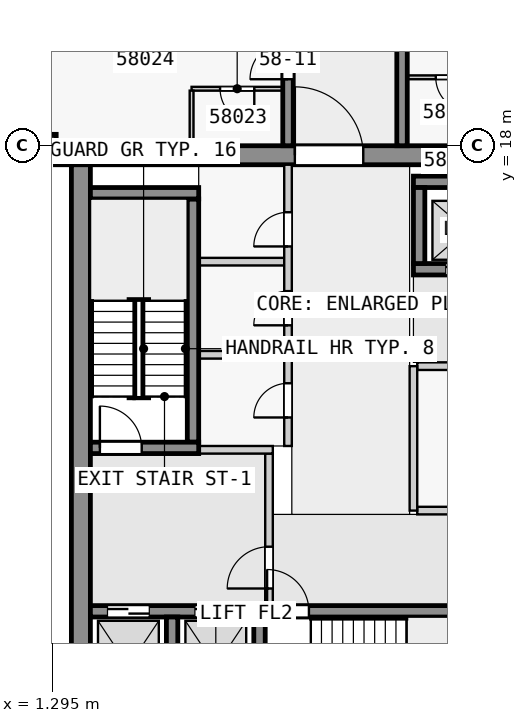
"""IFC4 building model, lengths in metres.
Left out: names, types, materials, properties, quantities, classifications, styles, units other than length and angle.
Written with IfcOpenShell. Run it as: python <this file> out.ifc"""

import sys

from ifc_helpers import new_model, si_unit, direction, frame, frame_2d, origin, origin_2d, place, context, subcontext, project, spatial, rectangle, extrude, element, fill, save


model = new_model("IFC4")
c1 = context("Model", 3, precision=1e-05, world=origin(), true_north=direction((0.0, 1.0)))
c2 = subcontext(c1, "Body", "Model", "MODEL_VIEW")
j1 = project(units=[si_unit("LENGTHUNIT", "METRE"), si_unit("PLANEANGLEUNIT", "RADIAN")], contexts=[c1])
p1 = place(None, origin())
s1 = spatial("IfcSite", under=j1, at=p1, CompositionType="ELEMENT")
p2 = place(p1, origin())
s2 = spatial("IfcBuilding", under=s1, at=p2, CompositionType="ELEMENT")
p3 = place(p2, frame((0.0, 0.0, 222.4)))
s3 = spatial("IfcBuildingStorey", under=s2, at=p3, CompositionType="ELEMENT", Elevation=222.4)
p4 = place(p3, frame((0.7, 18.0, 0.0), z_axis=(0.0, 0.0, 1.0), x_axis=(0.0, 1.0, 0.0)))
e1 = element("IfcColumn", 1, at=p4, inside=s3, PredefinedType="COLUMN", context=c2, shape_type="SweptSolid", body=[
    extrude(rectangle(XDim=0.6, YDim=1.4, at=origin_2d()), origin(), (0.0, 0.0, 1.0), 3.5),
])
p5 = place(p3, frame((1.38, 17.75, 0.0), z_axis=(0.0, 0.0, 1.0), x_axis=(1.0, 0.0, 0.0)))
e2 = element("IfcWall", 2, at=p5, inside=s3, PredefinedType="SHEAR", context=c2, shape_type="SweptSolid", body=[
    extrude(rectangle(XDim=21.12, YDim=0.5, at=frame_2d((10.56, 0.0))), origin(), (0.0, 0.0, 1.0), 3.25),
])
p6 = place(p5, frame((6.3, 0.0, 0.0)))
e3 = element("IfcOpeningElement", 3, at=p6, cuts=e2, PredefinedType="OPENING", context=c2, shape_type="SweptSolid", body=[
    extrude(rectangle(XDim=1.8, YDim=2.1, at=frame_2d((0.9, 1.05))), frame((0.0, 0.26, 0.0), z_axis=(0.0, -1.0, 0.0), x_axis=(1.0, 0.0, 0.0)), (0.0, 0.0, 1.0), 0.52),
])
p7 = place(p3, frame((2.05, 2.5, 0.0), z_axis=(0.0, 0.0, 1.0), x_axis=(0.0, 1.0, 0.0)))
e4 = element("IfcWall", 4, at=p7, inside=s3, PredefinedType="SHEAR", context=c2, shape_type="SweptSolid", body=[
    extrude(rectangle(XDim=15.0, YDim=0.5, at=frame_2d((7.5, 0.0))), origin(), (0.0, 0.0, 1.0), 3.25),
])
for number, where, z_axis, x_axis in (
    (5, (4.45, 2.8, 0.0), (0.0, 0.0, 1.0), (0.0, 1.0, 0.0)),
    (6, (6.75, 2.8, 0.0), (0.0, 0.0, 1.0), (0.0, 1.0, 0.0)),
):
    element("IfcWall", number, at=place(p3, frame(where, z_axis=z_axis, x_axis=x_axis)), inside=s3, PredefinedType="SHEAR", context=c2, shape_type="SweptSolid", body=[
        extrude(rectangle(XDim=2.8, YDim=0.3, at=frame_2d((1.4, 0.0))), origin(), (0.0, 0.0, 1.0), 3.25),
    ])
p8 = place(p3, frame((2.3, 5.75, 0.0), z_axis=(0.0, 0.0, 1.0), x_axis=(1.0, 0.0, 0.0)))
e7 = element("IfcWall", 7, at=p8, inside=s3, PredefinedType="SHEAR", context=c2, shape_type="SweptSolid", body=[
    extrude(rectangle(XDim=18.8, YDim=0.3, at=frame_2d((9.4, 0.0))), origin(), (0.0, 0.0, 1.0), 3.25),
])
p9 = place(p8, frame((4.65, 0.0, 0.0)))
e8 = element("IfcOpeningElement", 8, at=p9, cuts=e7, PredefinedType="OPENING", context=c2, shape_type="SweptSolid", body=[
    extrude(rectangle(XDim=1.1, YDim=2.1, at=frame_2d((0.55, 1.05))), frame((0.0, 0.16, 0.0), z_axis=(0.0, -1.0, 0.0), x_axis=(1.0, 0.0, 0.0)), (0.0, 0.0, 1.0), 0.32),
])
p10 = place(p8, frame((0.45, 0.0, 0.0)))
e9 = element("IfcOpeningElement", 9, at=p10, cuts=e7, PredefinedType="OPENING", context=c2, shape_type="SweptSolid", body=[
    extrude(rectangle(XDim=1.1, YDim=2.1, at=frame_2d((0.55, 1.05))), frame((0.0, 0.16, 0.0), z_axis=(0.0, -1.0, 0.0), x_axis=(1.0, 0.0, 0.0)), (0.0, 0.0, 1.0), 0.32),
])
p11 = place(p8, frame((2.75, 0.0, 0.0)))
e10 = element("IfcOpeningElement", 10, at=p11, cuts=e7, PredefinedType="OPENING", context=c2, shape_type="SweptSolid", body=[
    extrude(rectangle(XDim=1.1, YDim=2.1, at=frame_2d((0.55, 1.05))), frame((0.0, 0.16, 0.0), z_axis=(0.0, -1.0, 0.0), x_axis=(1.0, 0.0, 0.0)), (0.0, 0.0, 1.0), 0.32),
])
p12 = place(p8, frame((14.45, 0.0, 0.0)))
e11 = element("IfcOpeningElement", 11, at=p12, cuts=e7, PredefinedType="OPENING", context=c2, shape_type="SweptSolid", body=[
    extrude(rectangle(XDim=0.9, YDim=2.1, at=frame_2d((0.45, 1.05))), frame((0.0, 0.16, 0.0), z_axis=(0.0, -1.0, 0.0), x_axis=(1.0, 0.0, 0.0)), (0.0, 0.0, 1.0), 0.32),
])
p13 = place(p3, frame((2.3, 10.05, 0.0), z_axis=(0.0, 0.0, 1.0), x_axis=(1.0, 0.0, 0.0)))
e12 = element("IfcWall", 12, at=p13, inside=s3, PredefinedType="SHEAR", context=c2, shape_type="SweptSolid", body=[
    extrude(rectangle(XDim=2.85, YDim=0.3, at=frame_2d((1.425, 0.0))), origin(), (0.0, 0.0, 1.0), 3.25),
])
p14 = place(p13, frame((0.25, 0.0, 0.0)))
e13 = element("IfcOpeningElement", 13, at=p14, cuts=e12, PredefinedType="OPENING", context=c2, shape_type="SweptSolid", body=[
    extrude(rectangle(XDim=1.1, YDim=2.1, at=frame_2d((0.55, 1.05))), frame((0.0, 0.16, 0.0), z_axis=(0.0, -1.0, 0.0), x_axis=(1.0, 0.0, 0.0)), (0.0, 0.0, 1.0), 0.32),
])
p15 = place(p3, frame((5.0, 10.2, 0.0), z_axis=(0.0, 0.0, 1.0), x_axis=(0.0, 1.0, 0.0)))
e14 = element("IfcWall", 14, at=p15, inside=s3, PredefinedType="SHEAR", context=c2, shape_type="SweptSolid", body=[
    extrude(rectangle(XDim=6.4, YDim=0.3, at=frame_2d((3.2, 0.0))), origin(), (0.0, 0.0, 1.0), 3.25),
])
p16 = place(p3, frame((2.3, 16.75, 0.0), z_axis=(0.0, 0.0, 1.0), x_axis=(1.0, 0.0, 0.0)))
e15 = element("IfcWall", 15, at=p16, inside=s3, PredefinedType="SHEAR", context=c2, shape_type="SweptSolid", body=[
    extrude(rectangle(XDim=2.85, YDim=0.3, at=frame_2d((1.425, 0.0))), origin(), (0.0, 0.0, 1.0), 3.25),
])
p17 = place(p3, frame((10.8, 17.05, 0.0), z_axis=(0.0, 0.0, 1.0), x_axis=(1.0, 0.0, 0.0)))
e16 = element("IfcWall", 16, at=p17, inside=s3, PredefinedType="SHEAR", context=c2, shape_type="SweptSolid", body=[
    extrude(rectangle(XDim=7.8, YDim=0.3, at=frame_2d((3.9, 0.0))), origin(), (0.0, 0.0, 1.0), 3.25),
])
p18 = place(p3, frame((10.8, 14.75, 0.0), z_axis=(0.0, 0.0, 1.0), x_axis=(1.0, 0.0, 0.0)))
e17 = element("IfcWall", 17, at=p18, inside=s3, PredefinedType="SHEAR", context=c2, shape_type="SweptSolid", body=[
    extrude(rectangle(XDim=7.8, YDim=0.3, at=frame_2d((3.9, 0.0))), origin(), (0.0, 0.0, 1.0), 3.25),
])
p19 = place(p18, frame((0.85, 0.0, 0.0)))
e18 = element("IfcOpeningElement", 18, at=p19, cuts=e17, PredefinedType="OPENING", context=c2, shape_type="SweptSolid", body=[
    extrude(rectangle(XDim=1.1, YDim=2.1, at=frame_2d((0.55, 1.05))), frame((0.0, 0.16, 0.0), z_axis=(0.0, -1.0, 0.0), x_axis=(1.0, 0.0, 0.0)), (0.0, 0.0, 1.0), 0.32),
])
p20 = place(p18, frame((3.35, 0.0, 0.0)))
e19 = element("IfcOpeningElement", 19, at=p20, cuts=e17, PredefinedType="OPENING", context=c2, shape_type="SweptSolid", body=[
    extrude(rectangle(XDim=1.1, YDim=2.1, at=frame_2d((0.55, 1.05))), frame((0.0, 0.16, 0.0), z_axis=(0.0, -1.0, 0.0), x_axis=(1.0, 0.0, 0.0)), (0.0, 0.0, 1.0), 0.32),
])
p21 = place(p18, frame((5.85, 0.0, 0.0)))
e20 = element("IfcOpeningElement", 20, at=p21, cuts=e17, PredefinedType="OPENING", context=c2, shape_type="SweptSolid", body=[
    extrude(rectangle(XDim=1.1, YDim=2.1, at=frame_2d((0.55, 1.05))), frame((0.0, 0.16, 0.0), z_axis=(0.0, -1.0, 0.0), x_axis=(1.0, 0.0, 0.0)), (0.0, 0.0, 1.0), 0.32),
])
p22 = place(p3, frame((10.95, 14.9, 0.0), z_axis=(0.0, 0.0, 1.0), x_axis=(0.0, 1.0, 0.0)))
e21 = element("IfcWall", 21, at=p22, inside=s3, PredefinedType="SHEAR", context=c2, shape_type="SweptSolid", body=[
    extrude(rectangle(XDim=2.0, YDim=0.3, at=frame_2d((1.0, 0.0))), origin(), (0.0, 0.0, 1.0), 3.25),
])
p23 = place(p3, frame((7.5, 18.0, 0.0), z_axis=(0.0, 0.0, 1.0), x_axis=(0.0, 1.0, 0.0)))
e22 = element("IfcWall", 22, at=p23, inside=s3, PredefinedType="SHEAR", context=c2, shape_type="SweptSolid", body=[
    extrude(rectangle(XDim=27.0, YDim=0.275, at=frame_2d((13.5, 0.0))), origin(), (0.0, 0.0, 1.0), 3.25),
])
p24 = place(p23, frame((1.75, 0.0, 0.0)))
e23 = element("IfcOpeningElement", 23, at=p24, cuts=e22, PredefinedType="OPENING", context=c2, shape_type="SweptSolid", body=[
    extrude(rectangle(XDim=1.0, YDim=2.1, at=frame_2d((0.5, 1.05))), frame((0.0, 0.147, 0.0), z_axis=(0.0, -1.0, 0.0), x_axis=(1.0, 0.0, 0.0)), (0.0, 0.0, 1.0), 0.295),
])
p25 = place(p23, frame((8.55, 0.0, 0.0)))
e24 = element("IfcOpeningElement", 24, at=p25, cuts=e22, PredefinedType="OPENING", context=c2, shape_type="SweptSolid", body=[
    extrude(rectangle(XDim=1.0, YDim=2.1, at=frame_2d((0.5, 1.05))), frame((0.0, 0.147, 0.0), z_axis=(0.0, -1.0, 0.0), x_axis=(1.0, 0.0, 0.0)), (0.0, 0.0, 1.0), 0.295),
])
p26 = place(p23, frame((17.55, 0.0, 0.0)))
e25 = element("IfcOpeningElement", 25, at=p26, cuts=e22, PredefinedType="OPENING", context=c2, shape_type="SweptSolid", body=[
    extrude(rectangle(XDim=1.0, YDim=2.1, at=frame_2d((0.5, 1.05))), frame((0.0, 0.147, 0.0), z_axis=(0.0, -1.0, 0.0), x_axis=(1.0, 0.0, 0.0)), (0.0, 0.0, 1.0), 0.295),
])
p27 = place(p23, frame((23.25, 0.0, 0.0)))
e26 = element("IfcOpeningElement", 26, at=p27, cuts=e22, PredefinedType="OPENING", context=c2, shape_type="SweptSolid", body=[
    extrude(rectangle(XDim=0.9, YDim=2.1, at=frame_2d((0.45, 1.05))), frame((0.0, 0.147, 0.0), z_axis=(0.0, -1.0, 0.0), x_axis=(1.0, 0.0, 0.0)), (0.0, 0.0, 1.0), 0.295),
])
p28 = place(p23, frame((25.45, 0.0, 0.0)))
e27 = element("IfcOpeningElement", 27, at=p28, cuts=e22, PredefinedType="OPENING", context=c2, shape_type="SweptSolid", body=[
    extrude(rectangle(XDim=1.0, YDim=2.1, at=frame_2d((0.5, 1.05))), frame((0.0, 0.147, 0.0), z_axis=(0.0, -1.0, 0.0), x_axis=(1.0, 0.0, 0.0)), (0.0, 0.0, 1.0), 0.295),
])
p29 = place(p3, frame((10.5, 18.0, 0.0), z_axis=(0.0, 0.0, 1.0), x_axis=(0.0, 1.0, 0.0)))
e28 = element("IfcWall", 28, at=p29, inside=s3, PredefinedType="SHEAR", context=c2, shape_type="SweptSolid", body=[
    extrude(rectangle(XDim=27.0, YDim=0.275, at=frame_2d((13.5, 0.0))), origin(), (0.0, 0.0, 1.0), 3.25),
])
p30 = place(p29, frame((4.05, 0.0, 0.0)))
e29 = element("IfcOpeningElement", 29, at=p30, cuts=e28, PredefinedType="OPENING", context=c2, shape_type="SweptSolid", body=[
    extrude(rectangle(XDim=1.0, YDim=2.1, at=frame_2d((0.5, 1.05))), frame((0.0, 0.147, 0.0), z_axis=(0.0, -1.0, 0.0), x_axis=(1.0, 0.0, 0.0)), (0.0, 0.0, 1.0), 0.295),
])
p31 = place(p29, frame((10.35, 0.0, 0.0)))
e30 = element("IfcOpeningElement", 30, at=p31, cuts=e28, PredefinedType="OPENING", context=c2, shape_type="SweptSolid", body=[
    extrude(rectangle(XDim=1.8, YDim=2.1, at=frame_2d((0.9, 1.05))), frame((0.0, 0.147, 0.0), z_axis=(0.0, -1.0, 0.0), x_axis=(1.0, 0.0, 0.0)), (0.0, 0.0, 1.0), 0.295),
])
p32 = place(p29, frame((15.25, 0.0, 0.0)))
e31 = element("IfcOpeningElement", 31, at=p32, cuts=e28, PredefinedType="OPENING", context=c2, shape_type="SweptSolid", body=[
    extrude(rectangle(XDim=1.0, YDim=2.1, at=frame_2d((0.5, 1.05))), frame((0.0, 0.147, 0.0), z_axis=(0.0, -1.0, 0.0), x_axis=(1.0, 0.0, 0.0)), (0.0, 0.0, 1.0), 0.295),
])
p33 = place(p29, frame((21.35, 0.0, 0.0)))
e32 = element("IfcOpeningElement", 32, at=p33, cuts=e28, PredefinedType="OPENING", context=c2, shape_type="SweptSolid", body=[
    extrude(rectangle(XDim=1.0, YDim=2.1, at=frame_2d((0.5, 1.05))), frame((0.0, 0.147, 0.0), z_axis=(0.0, -1.0, 0.0), x_axis=(1.0, 0.0, 0.0)), (0.0, 0.0, 1.0), 0.295),
])
p34 = place(p3, frame((7.0, 5.9, 0.0), z_axis=(0.0, 0.0, 1.0), x_axis=(0.0, 1.0, 0.0)))
e33 = element("IfcWall", 33, at=p34, inside=s3, PredefinedType="PARTITIONING", context=c2, shape_type="SweptSolid", body=[
    extrude(rectangle(XDim=4.0, YDim=0.2, at=frame_2d((2.0, 0.0))), origin(), (0.0, 0.0, 1.0), 3.25),
])
p35 = place(p34, frame((0.45, 0.0, 0.0)))
e34 = element("IfcOpeningElement", 34, at=p35, cuts=e33, PredefinedType="OPENING", context=c2, shape_type="SweptSolid", body=[
    extrude(rectangle(XDim=1.1, YDim=2.1, at=frame_2d((0.55, 1.05))), frame((0.0, 0.11, 0.0), z_axis=(0.0, -1.0, 0.0), x_axis=(1.0, 0.0, 0.0)), (0.0, 0.0, 1.0), 0.22),
])
p36 = place(p3, frame((5.15, 10.0, 0.0), z_axis=(0.0, 0.0, 1.0), x_axis=(1.0, 0.0, 0.0)))
e35 = element("IfcWall", 35, at=p36, inside=s3, PredefinedType="PARTITIONING", context=c2, shape_type="SweptSolid", body=[
    extrude(rectangle(XDim=1.95, YDim=0.2, at=frame_2d((0.975, 0.0))), origin(), (0.0, 0.0, 1.0), 3.25),
])
p37 = place(p3, frame((10.8, 8.4, 0.0), z_axis=(0.0, 0.0, 1.0), x_axis=(0.0, 1.0, 0.0)))
e36 = element("IfcWall", 36, at=p37, inside=s3, PredefinedType="PARTITIONING", context=c2, shape_type="SweptSolid", body=[
    extrude(rectangle(XDim=3.8, YDim=0.2, at=frame_2d((1.9, 0.0))), origin(), (0.0, 0.0, 1.0), 3.25),
])
p38 = place(p3, frame((10.9, 8.4, 0.0), z_axis=(0.0, 0.0, 1.0), x_axis=(1.0, 0.0, 0.0)))
e37 = element("IfcWall", 37, at=p38, inside=s3, PredefinedType="PARTITIONING", context=c2, shape_type="SweptSolid", body=[
    extrude(rectangle(XDim=6.2, YDim=0.2, at=frame_2d((3.1, 0.0))), origin(), (0.0, 0.0, 1.0), 3.25),
])
p39 = place(p3, frame((10.9, 12.2, 0.0), z_axis=(0.0, 0.0, 1.0), x_axis=(1.0, 0.0, 0.0)))
e38 = element("IfcWall", 38, at=p39, inside=s3, PredefinedType="PARTITIONING", context=c2, shape_type="SweptSolid", body=[
    extrude(rectangle(XDim=6.2, YDim=0.2, at=frame_2d((3.1, 0.0))), origin(), (0.0, 0.0, 1.0), 3.25),
])
p40 = place(p39, frame((2.65, 0.0, 0.0)))
e39 = element("IfcOpeningElement", 39, at=p40, cuts=e38, PredefinedType="OPENING", context=c2, shape_type="SweptSolid", body=[
    extrude(rectangle(XDim=0.9, YDim=2.1, at=frame_2d((0.45, 1.05))), frame((0.0, 0.11, 0.0), z_axis=(0.0, -1.0, 0.0), x_axis=(1.0, 0.0, 0.0)), (0.0, 0.0, 1.0), 0.22),
])
p41 = place(p3, frame((7.5, 10.1, 0.0), z_axis=(0.0, 0.0, 1.0), x_axis=(0.0, 1.0, 0.0)))
e40 = element("IfcWall", 40, at=p41, inside=s3, PredefinedType="PARTITIONING", context=c2, shape_type="SweptSolid", body=[
    extrude(rectangle(XDim=7.4, YDim=0.2, at=frame_2d((3.7, 0.0))), origin(), (0.0, 0.0, 1.0), 3.25),
])
p42 = place(p41, frame((0.75, 0.0, 0.0)))
e41 = element("IfcOpeningElement", 41, at=p42, cuts=e40, PredefinedType="OPENING", context=c2, shape_type="SweptSolid", body=[
    extrude(rectangle(XDim=0.9, YDim=2.1, at=frame_2d((0.45, 1.05))), frame((0.0, 0.11, 0.0), z_axis=(0.0, -1.0, 0.0), x_axis=(1.0, 0.0, 0.0)), (0.0, 0.0, 1.0), 0.22),
])
p43 = place(p41, frame((3.175, 0.0, 0.0)))
e42 = element("IfcOpeningElement", 42, at=p43, cuts=e40, PredefinedType="OPENING", context=c2, shape_type="SweptSolid", body=[
    extrude(rectangle(XDim=0.9, YDim=2.1, at=frame_2d((0.45, 1.05))), frame((0.0, 0.11, 0.0), z_axis=(0.0, -1.0, 0.0), x_axis=(1.0, 0.0, 0.0)), (0.0, 0.0, 1.0), 0.22),
])
p44 = place(p41, frame((5.25, 0.0, 0.0)))
e43 = element("IfcOpeningElement", 43, at=p44, cuts=e40, PredefinedType="OPENING", context=c2, shape_type="SweptSolid", body=[
    extrude(rectangle(XDim=0.9, YDim=2.1, at=frame_2d((0.45, 1.05))), frame((0.0, 0.11, 0.0), z_axis=(0.0, -1.0, 0.0), x_axis=(1.0, 0.0, 0.0)), (0.0, 0.0, 1.0), 0.22),
])
for number, where, z_axis, x_axis in (
    (44, (5.15, 12.5, 0.0), (0.0, 0.0, 1.0), (1.0, 0.0, 0.0)),
    (45, (5.15, 14.95, 0.0), (0.0, 0.0, 1.0), (1.0, 0.0, 0.0)),
):
    element("IfcWall", number, at=place(p3, frame(where, z_axis=z_axis, x_axis=x_axis)), inside=s3, PredefinedType="PARTITIONING", context=c2, shape_type="SweptSolid", body=[
        extrude(rectangle(XDim=2.25, YDim=0.2, at=frame_2d((1.125, 0.0))), origin(), (0.0, 0.0, 1.0), 3.25),
    ])
p45 = place(p3, frame((7.363, 19.5, 0.0), z_axis=(0.0, 0.0, 1.0), x_axis=(-1.0, 0.0, 0.0)))
e46 = element("IfcWall", 46, at=p45, inside=s3, PredefinedType="PARTITIONING", context=c2, shape_type="SweptSolid", body=[
    extrude(rectangle(XDim=2.4, YDim=0.1, at=frame_2d((1.2, 0.0))), origin(), (0.0, 0.0, 1.0), 3.25),
])
p46 = place(p45, frame((0.75, 0.0, 0.0)))
e47 = element("IfcOpeningElement", 47, at=p46, cuts=e46, PredefinedType="OPENING", context=c2, shape_type="SweptSolid", body=[
    extrude(rectangle(XDim=0.9, YDim=2.1, at=frame_2d((0.45, 1.05))), frame((0.0, 0.06, 0.0), z_axis=(0.0, -1.0, 0.0), x_axis=(1.0, 0.0, 0.0)), (0.0, 0.0, 1.0), 0.12),
])
p47 = place(p3, frame((13.038, 19.8, 0.0), z_axis=(0.0, 0.0, 1.0), x_axis=(-1.0, 0.0, 0.0)))
e48 = element("IfcWall", 48, at=p47, inside=s3, PredefinedType="PARTITIONING", context=c2, shape_type="SweptSolid", body=[
    extrude(rectangle(XDim=2.4, YDim=0.1, at=frame_2d((1.2, 0.0))), origin(), (0.0, 0.0, 1.0), 3.25),
])
p48 = place(p47, frame((0.75, 0.0, 0.0)))
e49 = element("IfcOpeningElement", 49, at=p48, cuts=e48, PredefinedType="OPENING", context=c2, shape_type="SweptSolid", body=[
    extrude(rectangle(XDim=0.9, YDim=2.1, at=frame_2d((0.45, 1.05))), frame((0.0, 0.06, 0.0), z_axis=(0.0, -1.0, 0.0), x_axis=(1.0, 0.0, 0.0)), (0.0, 0.0, 1.0), 0.12),
])
p49 = place(p3, frame((4.962, 19.45, 0.0), z_axis=(0.0, 0.0, 1.0), x_axis=(0.0, -1.0, 0.0)))
e50 = element("IfcWall", 50, at=p49, inside=s3, PredefinedType="PARTITIONING", context=c2, shape_type="SweptSolid", body=[
    extrude(rectangle(XDim=1.45, YDim=0.1, at=frame_2d((0.725, 0.0))), origin(), (0.0, 0.0, 1.0), 3.25),
])
p50 = place(p35, origin())
e51 = element("IfcDoor", 51, at=p50, inside=s3, OperationType="SINGLE_SWING_LEFT", PredefinedType="DOOR", context=c2, shape_type="SweptSolid", body=[
    extrude(rectangle(XDim=1.1, YDim=2.1, at=frame_2d((0.55, 1.05))), frame((0.0, 0.025, 0.0), z_axis=(0.0, -1.0, 0.0), x_axis=(1.0, 0.0, 0.0)), (0.0, 0.0, 1.0), 0.05),
])
fill(e34, e51)
p51 = place(p14, origin())
e52 = element("IfcDoor", 52, at=p51, inside=s3, OperationType="SINGLE_SWING_RIGHT", PredefinedType="DOOR", context=c2, shape_type="SweptSolid", body=[
    extrude(rectangle(XDim=1.1, YDim=2.1, at=frame_2d((0.55, 1.05))), frame((0.0, 0.025, 0.0), z_axis=(0.0, -1.0, 0.0), x_axis=(1.0, 0.0, 0.0)), (0.0, 0.0, 1.0), 0.05),
])
fill(e13, e52)
p52 = place(p9, origin())
e53 = element("IfcDoor", 53, at=p52, inside=s3, OperationType="SINGLE_SWING_LEFT", PredefinedType="DOOR", context=c2, shape_type="SweptSolid", body=[
    extrude(rectangle(XDim=1.1, YDim=2.1, at=frame_2d((0.55, 1.05))), frame((0.0, 0.025, 0.0), z_axis=(0.0, -1.0, 0.0), x_axis=(1.0, 0.0, 0.0)), (0.0, 0.0, 1.0), 0.05),
])
fill(e8, e53)
p53 = place(p10, origin())
e54 = element("IfcDoor", 54, at=p53, inside=s3, OperationType="DOUBLE_DOOR_SLIDING", PredefinedType="DOOR", context=c2, shape_type="SweptSolid", body=[
    extrude(rectangle(XDim=1.1, YDim=2.1, at=frame_2d((0.55, 1.05))), frame((0.0, 0.025, 0.0), z_axis=(0.0, -1.0, 0.0), x_axis=(1.0, 0.0, 0.0)), (0.0, 0.0, 1.0), 0.05),
])
fill(e9, e54)
p54 = place(p11, origin())
e55 = element("IfcDoor", 55, at=p54, inside=s3, OperationType="DOUBLE_DOOR_SLIDING", PredefinedType="DOOR", context=c2, shape_type="SweptSolid", body=[
    extrude(rectangle(XDim=1.1, YDim=2.1, at=frame_2d((0.55, 1.05))), frame((0.0, 0.025, 0.0), z_axis=(0.0, -1.0, 0.0), x_axis=(1.0, 0.0, 0.0)), (0.0, 0.0, 1.0), 0.05),
])
fill(e10, e55)
p55 = place(p19, origin())
e56 = element("IfcDoor", 56, at=p55, inside=s3, OperationType="DOUBLE_DOOR_SLIDING", PredefinedType="DOOR", context=c2, shape_type="SweptSolid", body=[
    extrude(rectangle(XDim=1.1, YDim=2.1, at=frame_2d((0.55, 1.05))), frame((0.0, 0.025, 0.0), z_axis=(0.0, -1.0, 0.0), x_axis=(1.0, 0.0, 0.0)), (0.0, 0.0, 1.0), 0.05),
])
fill(e18, e56)
p56 = place(p6, origin())
e57 = element("IfcDoor", 57, at=p56, inside=s3, OperationType="DOUBLE_DOOR_SINGLE_SWING", PredefinedType="DOOR", context=c2, shape_type="SweptSolid", body=[
    extrude(rectangle(XDim=1.8, YDim=2.1, at=frame_2d((0.9, 1.05))), frame((0.0, 0.025, 0.0), z_axis=(0.0, -1.0, 0.0), x_axis=(1.0, 0.0, 0.0)), (0.0, 0.0, 1.0), 0.05),
])
fill(e3, e57)
p57 = place(p42, origin())
e58 = element("IfcDoor", 58, at=p57, inside=s3, OperationType="SINGLE_SWING_RIGHT", PredefinedType="DOOR", context=c2, shape_type="SweptSolid", body=[
    extrude(rectangle(XDim=0.9, YDim=2.1, at=frame_2d((0.45, 1.05))), frame((0.0, 0.025, 0.0), z_axis=(0.0, -1.0, 0.0), x_axis=(1.0, 0.0, 0.0)), (0.0, 0.0, 1.0), 0.05),
])
fill(e41, e58)
p58 = place(p43, origin())
e59 = element("IfcDoor", 59, at=p58, inside=s3, OperationType="SINGLE_SWING_RIGHT", PredefinedType="DOOR", context=c2, shape_type="SweptSolid", body=[
    extrude(rectangle(XDim=0.9, YDim=2.1, at=frame_2d((0.45, 1.05))), frame((0.0, 0.025, 0.0), z_axis=(0.0, -1.0, 0.0), x_axis=(1.0, 0.0, 0.0)), (0.0, 0.0, 1.0), 0.05),
])
fill(e42, e59)
p59 = place(p44, origin())
e60 = element("IfcDoor", 60, at=p59, inside=s3, OperationType="SINGLE_SWING_RIGHT", PredefinedType="DOOR", context=c2, shape_type="SweptSolid", body=[
    extrude(rectangle(XDim=0.9, YDim=2.1, at=frame_2d((0.45, 1.05))), frame((0.0, 0.025, 0.0), z_axis=(0.0, -1.0, 0.0), x_axis=(1.0, 0.0, 0.0)), (0.0, 0.0, 1.0), 0.05),
])
fill(e43, e60)
p60 = place(p24, origin())
e61 = element("IfcDoor", 61, at=p60, inside=s3, OperationType="SINGLE_SWING_LEFT", PredefinedType="DOOR", context=c2, shape_type="SweptSolid", body=[
    extrude(rectangle(XDim=1.0, YDim=2.1, at=frame_2d((0.5, 1.05))), frame((0.0, 0.025, 0.0), z_axis=(0.0, -1.0, 0.0), x_axis=(1.0, 0.0, 0.0)), (0.0, 0.0, 1.0), 0.05),
])
fill(e23, e61)
p61 = place(p46, origin())
e62 = element("IfcDoor", 62, at=p61, inside=s3, OperationType="SINGLE_SWING_RIGHT", PredefinedType="DOOR", context=c2, shape_type="SweptSolid", body=[
    extrude(rectangle(XDim=0.9, YDim=2.1, at=frame_2d((0.45, 1.05))), frame((0.0, 0.025, 0.0), z_axis=(0.0, -1.0, 0.0), x_axis=(1.0, 0.0, 0.0)), (0.0, 0.0, 1.0), 0.05),
])
fill(e47, e62)
p62 = place(p48, origin())
e63 = element("IfcDoor", 63, at=p62, inside=s3, OperationType="SINGLE_SWING_LEFT", PredefinedType="DOOR", context=c2, shape_type="SweptSolid", body=[
    extrude(rectangle(XDim=0.9, YDim=2.1, at=frame_2d((0.45, 1.05))), frame((0.0, 0.025, 0.0), z_axis=(0.0, -1.0, 0.0), x_axis=(1.0, 0.0, 0.0)), (0.0, 0.0, 1.0), 0.05),
])
fill(e49, e63)
save(model, sys.argv[1])
